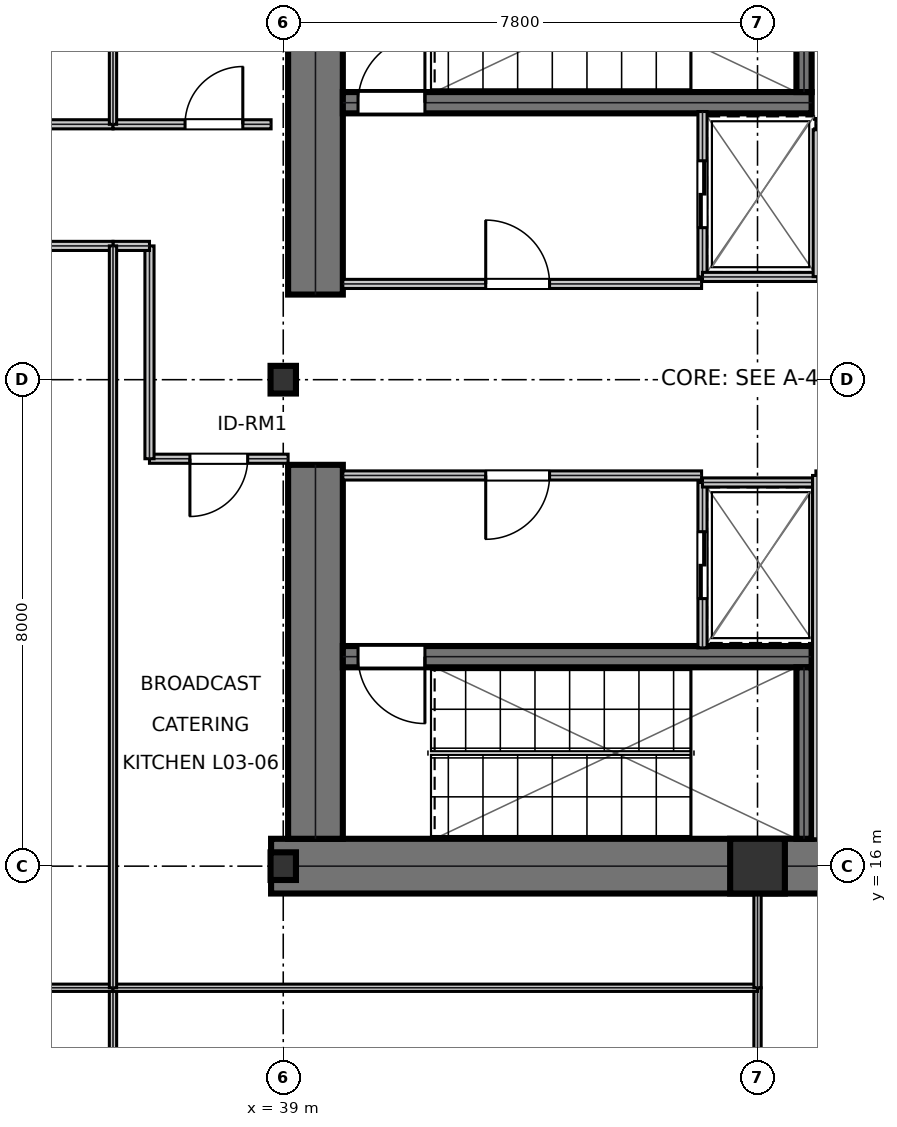
"""IFC4 building model, lengths in metres.
Left out: names, types, materials, properties, quantities, classifications, styles, units other than length and angle.
Written with IfcOpenShell. Run it as: python <this file> out.ifc"""

import sys

from ifc_helpers import new_model, si_unit, direction, frame, frame_2d, origin, origin_2d, place, context, subcontext, project, spatial, rectangle, i_section, extrude, element, fill, save


model = new_model("IFC4")
c1 = context("Model", 3, precision=1e-05, world=origin(), true_north=direction((0.0, 1.0)))
c2 = subcontext(c1, "Body", "Model", "MODEL_VIEW")
j1 = project(units=[si_unit("LENGTHUNIT", "METRE"), si_unit("PLANEANGLEUNIT", "RADIAN")], contexts=[c1])
p1 = place(None, origin())
s1 = spatial("IfcSite", under=j1, at=p1, CompositionType="ELEMENT")
p2 = place(p1, origin())
s2 = spatial("IfcBuilding", under=s1, at=p2, CompositionType="ELEMENT")
p3 = place(p2, frame((0.0, 0.0, 16.2)))
s3 = spatial("IfcBuildingStorey", under=s2, at=p3, CompositionType="ELEMENT", Elevation=16.2)
p4 = place(p3, frame((38.8, 16.0, 0.0), z_axis=(0.0, 0.0, 1.0), x_axis=(1.0, 0.0, 0.0)))
e1 = element("IfcWall", 1, at=p4, inside=s3, PredefinedType="SHEAR", context=c2, shape_type="SweptSolid", body=[
    extrude(rectangle(XDim=16.0, YDim=0.9, at=frame_2d((8.0, 0.0))), origin(), (0.0, 0.0, 1.0), 5.12),
])
for number, where, z_axis, x_axis in (
    (2, (39.53, 16.45, 0.0), (0.0, 0.0, 1.0), (0.0, 1.0, 0.0)),
    (3, (39.53, 25.4, 0.0), (0.0, 0.0, 1.0), (0.0, 1.0, 0.0)),
):
    element("IfcWall", number, at=place(p3, frame(where, z_axis=z_axis, x_axis=x_axis)), inside=s3, PredefinedType="SHEAR", context=c2, shape_type="SweptSolid", body=[
        extrude(rectangle(XDim=6.15, YDim=0.9, at=frame_2d((3.075, 0.0))), origin(), (0.0, 0.0, 1.0), 5.12),
    ])
p5 = place(p3, frame((39.98, 28.555, 0.0), z_axis=(0.0, 0.0, 1.0), x_axis=(1.0, 0.0, 0.0)))
e4 = element("IfcWall", 4, at=p5, inside=s3, PredefinedType="SHEAR", context=c2, shape_type="SweptSolid", body=[
    extrude(rectangle(XDim=7.71, YDim=0.35, at=frame_2d((3.855, 0.0))), origin(), (0.0, 0.0, 1.0), 5.12),
])
p6 = place(p5, frame((0.25, 0.0, 0.0)))
e5 = element("IfcOpeningElement", 5, at=p6, cuts=e4, PredefinedType="OPENING", context=c2, shape_type="SweptSolid", body=[
    extrude(rectangle(XDim=1.1, YDim=2.15, at=frame_2d((0.55, 1.075))), frame((0.0, 0.185, 0.0), z_axis=(0.0, -1.0, 0.0), x_axis=(1.0, 0.0, 0.0)), (0.0, 0.0, 1.0), 0.37),
])
p7 = place(p3, frame((39.98, 19.445, 0.0), z_axis=(0.0, 0.0, 1.0), x_axis=(1.0, 0.0, 0.0)))
e6 = element("IfcWall", 6, at=p7, inside=s3, PredefinedType="SHEAR", context=c2, shape_type="SweptSolid", body=[
    extrude(rectangle(XDim=7.71, YDim=0.35, at=frame_2d((3.855, 0.0))), origin(), (0.0, 0.0, 1.0), 5.12),
])
p8 = place(p7, frame((0.25, 0.0, 0.0)))
e7 = element("IfcOpeningElement", 7, at=p8, cuts=e6, PredefinedType="OPENING", context=c2, shape_type="SweptSolid", body=[
    extrude(rectangle(XDim=1.1, YDim=2.15, at=frame_2d((0.55, 1.075))), frame((0.0, 0.185, 0.0), z_axis=(0.0, -1.0, 0.0), x_axis=(1.0, 0.0, 0.0)), (0.0, 0.0, 1.0), 0.37),
])
for number, where, z_axis, x_axis in (
    (8, (47.565, 28.73, 0.0), (0.0, 0.0, 1.0), (0.0, 1.0, 0.0)),
    (9, (47.565, 16.45, 0.0), (0.0, 0.0, 1.0), (0.0, 1.0, 0.0)),
):
    element("IfcWall", number, at=place(p3, frame(where, z_axis=z_axis, x_axis=x_axis)), inside=s3, PredefinedType="SHEAR", context=c2, shape_type="SweptSolid", body=[
        extrude(rectangle(XDim=2.82, YDim=0.25, at=frame_2d((1.41, 0.0))), origin(), (0.0, 0.0, 1.0), 5.12),
    ])
for number, where, z_axis, x_axis in (
    (10, (39.0, 16.0, 0.0), (0.0, 0.0, 1.0), (1.0, 0.0, 0.0)),
    (11, (39.0, 24.0, 0.0), (0.0, 0.0, 1.0), (1.0, 0.0, 0.0)),
):
    element("IfcColumn", number, at=place(p3, frame(where, z_axis=z_axis, x_axis=x_axis)), inside=s3, PredefinedType="COLUMN", context=c2, shape_type="SweptSolid", body=[
        extrude(i_section(OverallWidth=0.418, OverallDepth=0.455, WebThickness=0.042, FlangeThickness=0.068, at=origin_2d()), origin(), (0.0, 0.0, 1.0), 5.395),
    ])
p9 = place(p3, frame((46.8, 16.0, 0.0), z_axis=(0.0, 0.0, 1.0), x_axis=(1.0, 0.0, 0.0)))
e12 = element("IfcColumn", 12, at=p9, inside=s3, PredefinedType="COLUMN", context=c2, shape_type="SweptSolid", body=[
    extrude(rectangle(XDim=0.9, YDim=0.9, at=origin_2d()), origin(), (0.0, 0.0, 1.0), 5.395),
])
p10 = place(p3, frame((39.98, 25.575, 0.0), z_axis=(0.0, 0.0, 1.0), x_axis=(1.0, 0.0, 0.0)))
e13 = element("IfcWall", 13, at=p10, inside=s3, PredefinedType="PARTITIONING", context=c2, shape_type="SweptSolid", body=[
    extrude(rectangle(XDim=5.9, YDim=0.15, at=frame_2d((2.95, 0.0))), origin(), (0.0, 0.0, 1.0), 5.12),
])
p11 = place(p10, frame((2.35, 0.0, 0.0)))
e14 = element("IfcOpeningElement", 14, at=p11, cuts=e13, PredefinedType="OPENING", context=c2, shape_type="SweptSolid", body=[
    extrude(rectangle(XDim=1.05, YDim=2.15, at=frame_2d((0.525, 1.075))), frame((0.0, 0.085, 0.0), z_axis=(0.0, -1.0, 0.0), x_axis=(1.0, 0.0, 0.0)), (0.0, 0.0, 1.0), 0.17),
])
p12 = place(p3, frame((39.98, 22.425, 0.0), z_axis=(0.0, 0.0, 1.0), x_axis=(1.0, 0.0, 0.0)))
e15 = element("IfcWall", 15, at=p12, inside=s3, PredefinedType="PARTITIONING", context=c2, shape_type="SweptSolid", body=[
    extrude(rectangle(XDim=5.9, YDim=0.15, at=frame_2d((2.95, 0.0))), origin(), (0.0, 0.0, 1.0), 5.12),
])
p13 = place(p12, frame((2.35, 0.0, 0.0)))
e16 = element("IfcOpeningElement", 16, at=p13, cuts=e15, PredefinedType="OPENING", context=c2, shape_type="SweptSolid", body=[
    extrude(rectangle(XDim=1.05, YDim=2.15, at=frame_2d((0.525, 1.075))), frame((0.0, 0.085, 0.0), z_axis=(0.0, -1.0, 0.0), x_axis=(1.0, 0.0, 0.0)), (0.0, 0.0, 1.0), 0.17),
])
p14 = place(p3, frame((45.895, 25.69, 0.0), z_axis=(0.0, 0.0, 1.0), x_axis=(0.0, 1.0, 0.0)))
e17 = element("IfcWall", 17, at=p14, inside=s3, PredefinedType="PARTITIONING", context=c2, shape_type="SweptSolid", body=[
    extrude(rectangle(XDim=2.72, YDim=0.15, at=frame_2d((1.36, 0.0))), origin(), (0.0, 0.0, 1.0), 5.12),
])
p15 = place(p14, frame((0.81, 0.0, 0.0)))
e18 = element("IfcOpeningElement", 18, at=p15, cuts=e17, PredefinedType="OPENING", context=c2, shape_type="SweptSolid", body=[
    extrude(rectangle(XDim=1.1, YDim=2.15, at=frame_2d((0.55, 1.075))), frame((0.0, 0.085, 0.0), z_axis=(0.0, -1.0, 0.0), x_axis=(1.0, 0.0, 0.0)), (0.0, 0.0, 1.0), 0.17),
])
p16 = place(p3, frame((45.895, 25.69, 0.0), z_axis=(0.0, 0.0, 1.0), x_axis=(1.0, 0.0, 0.0)))
e19 = element("IfcWall", 19, at=p16, inside=s3, PredefinedType="PARTITIONING", context=c2, shape_type="SweptSolid", body=[
    extrude(rectangle(XDim=1.915, YDim=0.15, at=frame_2d((0.958, 0.0))), origin(), (0.0, 0.0, 1.0), 5.12),
])
p17 = place(p3, frame((45.895, 19.59, 0.0), z_axis=(0.0, 0.0, 1.0), x_axis=(0.0, 1.0, 0.0)))
e20 = element("IfcWall", 20, at=p17, inside=s3, PredefinedType="PARTITIONING", context=c2, shape_type="SweptSolid", body=[
    extrude(rectangle(XDim=2.72, YDim=0.15, at=frame_2d((1.36, 0.0))), origin(), (0.0, 0.0, 1.0), 5.12),
])
p18 = place(p17, frame((0.81, 0.0, 0.0)))
e21 = element("IfcOpeningElement", 21, at=p18, cuts=e20, PredefinedType="OPENING", context=c2, shape_type="SweptSolid", body=[
    extrude(rectangle(XDim=1.1, YDim=2.15, at=frame_2d((0.55, 1.075))), frame((0.0, 0.085, 0.0), z_axis=(0.0, -1.0, 0.0), x_axis=(1.0, 0.0, 0.0)), (0.0, 0.0, 1.0), 0.17),
])
p19 = place(p3, frame((45.895, 22.31, 0.0), z_axis=(0.0, 0.0, 1.0), x_axis=(1.0, 0.0, 0.0)))
e22 = element("IfcWall", 22, at=p19, inside=s3, PredefinedType="PARTITIONING", context=c2, shape_type="SweptSolid", body=[
    extrude(rectangle(XDim=1.915, YDim=0.15, at=frame_2d((0.958, 0.0))), origin(), (0.0, 0.0, 1.0), 5.12),
])
p20 = place(p3, frame((47.79, 25.695, 0.0), z_axis=(0.0, 0.0, 1.0), x_axis=(0.0, 1.0, 0.0)))
e23 = element("IfcWall", 23, at=p20, inside=s3, PredefinedType="PARTITIONING", context=c2, shape_type="SweptSolid", body=[
    extrude(rectangle(XDim=2.415, YDim=0.15, at=frame_2d((1.208, 0.0))), origin(), (0.0, 0.0, 1.0), 5.12),
])
p21 = place(p3, frame((47.76, 22.425, 0.0), z_axis=(0.0, 0.0, 1.0), x_axis=(1.0, 0.0, 0.0)))
e24 = element("IfcWall", 24, at=p21, inside=s3, PredefinedType="PARTITIONING", context=c2, shape_type="SweptSolid", body=[
    extrude(rectangle(XDim=1.96, YDim=0.15, at=frame_2d((0.98, 0.0))), origin(), (0.0, 0.0, 1.0), 5.12),
])
p22 = place(p3, frame((47.78, 16.45, 0.0), z_axis=(0.0, 0.0, 1.0), x_axis=(0.0, 1.0, 0.0)))
e25 = element("IfcWall", 25, at=p22, inside=s3, PredefinedType="PARTITIONING", context=c2, shape_type="SweptSolid", body=[
    extrude(rectangle(XDim=5.975, YDim=0.15, at=frame_2d((2.988, 0.0))), origin(), (0.0, 0.0, 1.0), 5.12),
])
p23 = place(p3, frame((47.76, 28.22, 0.0), z_axis=(0.0, 0.0, 1.0), x_axis=(1.0, 0.0, 0.0)))
e26 = element("IfcWall", 26, at=p23, inside=s3, PredefinedType="PARTITIONING", context=c2, shape_type="SweptSolid", body=[
    extrude(rectangle(XDim=1.96, YDim=0.15, at=frame_2d((0.98, 0.0))), origin(), (0.0, 0.0, 1.0), 5.12),
])
p24 = place(p3, frame((36.8, 22.7, 0.0), z_axis=(0.0, 0.0, 1.0), x_axis=(1.0, 0.0, 0.0)))
e27 = element("IfcWall", 27, at=p24, inside=s3, PredefinedType="PARTITIONING", context=c2, shape_type="SweptSolid", body=[
    extrude(rectangle(XDim=2.28, YDim=0.15, at=frame_2d((1.14, 0.0))), origin(), (0.0, 0.0, 1.0), 4.415),
])
p25 = place(p24, frame((0.665, 0.0, 0.0)))
e28 = element("IfcOpeningElement", 28, at=p25, cuts=e27, PredefinedType="OPENING", context=c2, shape_type="SweptSolid", body=[
    extrude(rectangle(XDim=0.95, YDim=2.15, at=frame_2d((0.475, 1.075))), frame((0.0, 0.085, 0.0), z_axis=(0.0, -1.0, 0.0), x_axis=(1.0, 0.0, 0.0)), (0.0, 0.0, 1.0), 0.17),
])
p26 = place(p3, frame((28.2, 28.2, 0.0), z_axis=(0.0, 0.0, 1.0), x_axis=(1.0, 0.0, 0.0)))
e29 = element("IfcWall", 29, at=p26, inside=s3, PredefinedType="PARTITIONING", context=c2, shape_type="SweptSolid", body=[
    extrude(rectangle(XDim=8.0, YDim=0.15, at=frame_2d((4.0, 0.0))), origin(), (0.0, 0.0, 1.0), 4.415),
])
p27 = place(p26, frame((3.55, 0.0, 0.0)))
e30 = element("IfcOpeningElement", 30, at=p27, cuts=e29, PredefinedType="OPENING", context=c2, shape_type="SweptSolid", body=[
    extrude(rectangle(XDim=0.9, YDim=2.15, at=frame_2d((0.45, 1.075))), frame((0.0, 0.085, 0.0), z_axis=(0.0, -1.0, 0.0), x_axis=(1.0, 0.0, 0.0)), (0.0, 0.0, 1.0), 0.17),
])
p28 = place(p3, frame((36.2, 28.2, 0.0), z_axis=(0.0, 0.0, 1.0), x_axis=(1.0, 0.0, 0.0)))
e31 = element("IfcWall", 31, at=p28, inside=s3, PredefinedType="PARTITIONING", context=c2, shape_type="SweptSolid", body=[
    extrude(rectangle(XDim=2.6, YDim=0.15, at=frame_2d((1.3, 0.0))), origin(), (0.0, 0.0, 1.0), 5.12),
])
p29 = place(p28, frame((1.185, 0.0, 0.0)))
e32 = element("IfcOpeningElement", 32, at=p29, cuts=e31, PredefinedType="OPENING", context=c2, shape_type="SweptSolid", body=[
    extrude(rectangle(XDim=0.95, YDim=2.15, at=frame_2d((0.475, 1.075))), frame((0.0, 0.085, 0.0), z_axis=(0.0, -1.0, 0.0), x_axis=(1.0, 0.0, 0.0)), (0.0, 0.0, 1.0), 0.17),
])
p30 = place(p3, frame((36.8, 22.7, 0.0), z_axis=(0.0, 0.0, 1.0), x_axis=(0.0, 1.0, 0.0)))
e33 = element("IfcWall", 33, at=p30, inside=s3, PredefinedType="PARTITIONING", context=c2, shape_type="SweptSolid", body=[
    extrude(rectangle(XDim=3.5, YDim=0.15, at=frame_2d((1.75, 0.0))), origin(), (0.0, 0.0, 1.0), 4.338),
])
p31 = place(p3, frame((36.2, 26.2, 0.0), z_axis=(0.0, 0.0, 1.0), x_axis=(1.0, 0.0, 0.0)))
e34 = element("IfcWall", 34, at=p31, inside=s3, PredefinedType="PARTITIONING", context=c2, shape_type="SweptSolid", body=[
    extrude(rectangle(XDim=0.6, YDim=0.15, at=frame_2d((0.3, 0.0))), origin(), (0.0, 0.0, 1.0), 5.12),
])
p32 = place(p3, frame((28.2, 26.2, 0.0), z_axis=(0.0, 0.0, 1.0), x_axis=(1.0, 0.0, 0.0)))
e35 = element("IfcWall", 35, at=p32, inside=s3, PredefinedType="PARTITIONING", context=c2, shape_type="SweptSolid", body=[
    extrude(rectangle(XDim=8.0, YDim=0.15, at=frame_2d((4.0, 0.0))), origin(), (0.0, 0.0, 1.0), 4.415),
])
p33 = place(p3, frame((36.2, 4.5, 0.0), z_axis=(0.0, 0.0, 1.0), x_axis=(0.0, 1.0, 0.0)))
e36 = element("IfcWall", 36, at=p33, inside=s3, PredefinedType="PARTITIONING", context=c2, shape_type="SweptSolid", body=[
    extrude(rectangle(XDim=9.5, YDim=0.12, at=frame_2d((4.75, 0.0))), origin(), (0.0, 0.0, 1.0), 4.338),
])
p34 = place(p3, frame((28.2, 14.0, 0.0), z_axis=(0.0, 0.0, 1.0), x_axis=(1.0, 0.0, 0.0)))
e37 = element("IfcWall", 37, at=p34, inside=s3, PredefinedType="PARTITIONING", context=c2, shape_type="SweptSolid", body=[
    extrude(rectangle(XDim=8.0, YDim=0.12, at=frame_2d((4.0, 0.0))), origin(), (0.0, 0.0, 1.0), 3.688),
])
p35 = place(p3, frame((46.8, 4.5, 0.0), z_axis=(0.0, 0.0, 1.0), x_axis=(0.0, 1.0, 0.0)))
e38 = element("IfcWall", 38, at=p35, inside=s3, PredefinedType="PARTITIONING", context=c2, shape_type="SweptSolid", body=[
    extrude(rectangle(XDim=9.5, YDim=0.12, at=frame_2d((4.75, 0.0))), origin(), (0.0, 0.0, 1.0), 4.338),
])
p36 = place(p3, frame((36.2, 14.0, 0.0), z_axis=(0.0, 0.0, 1.0), x_axis=(1.0, 0.0, 0.0)))
e39 = element("IfcWall", 39, at=p36, inside=s3, PredefinedType="PARTITIONING", context=c2, shape_type="SweptSolid", body=[
    extrude(rectangle(XDim=10.6, YDim=0.12, at=frame_2d((5.3, 0.0))), origin(), (0.0, 0.0, 1.0), 4.415),
])
p37 = place(p3, frame((46.8, 14.0, 0.0), z_axis=(0.0, 0.0, 1.0), x_axis=(0.0, 1.0, 0.0)))
e40 = element("IfcWall", 40, at=p37, inside=s3, PredefinedType="PARTITIONING", context=c2, shape_type="SweptSolid", body=[
    extrude(rectangle(XDim=1.6, YDim=0.12, at=frame_2d((0.8, 0.0))), origin(), (0.0, 0.0, 1.0), 4.415),
])
p38 = place(p3, frame((36.2, 14.0, 0.0), z_axis=(0.0, 0.0, 1.0), x_axis=(0.0, 1.0, 0.0)))
e41 = element("IfcWall", 41, at=p38, inside=s3, PredefinedType="PARTITIONING", context=c2, shape_type="SweptSolid", body=[
    extrude(rectangle(XDim=12.2, YDim=0.12, at=frame_2d((6.1, 0.0))), origin(), (0.0, 0.0, 1.0), 3.688),
])
p39 = place(p3, frame((36.2, 28.2, 0.0), z_axis=(0.0, 0.0, 1.0), x_axis=(0.0, 1.0, 0.0)))
e42 = element("IfcWall", 42, at=p39, inside=s3, PredefinedType="PARTITIONING", context=c2, shape_type="SweptSolid", body=[
    extrude(rectangle(XDim=7.5, YDim=0.12, at=frame_2d((3.75, 0.0))), origin(), (0.0, 0.0, 1.0), 4.338),
])
p40 = place(p11, origin())
e43 = element("IfcDoor", 43, at=p40, inside=s3, OperationType="SINGLE_SWING_LEFT", PredefinedType="DOOR", context=c2, shape_type="SweptSolid", body=[
    extrude(rectangle(XDim=1.05, YDim=2.15, at=frame_2d((0.525, 1.075))), frame((0.0, 0.025, 0.0), z_axis=(0.0, -1.0, 0.0), x_axis=(1.0, 0.0, 0.0)), (0.0, 0.0, 1.0), 0.05),
])
fill(e14, e43)
p41 = place(p13, frame((1.05, 0.0, 0.0), z_axis=(0.0, 0.0, 1.0), x_axis=(-1.0, 0.0, 0.0)))
e44 = element("IfcDoor", 44, at=p41, inside=s3, OperationType="SINGLE_SWING_RIGHT", PredefinedType="DOOR", context=c2, shape_type="SweptSolid", body=[
    extrude(rectangle(XDim=1.05, YDim=2.15, at=frame_2d((0.525, 1.075))), frame((0.0, 0.025, 0.0), z_axis=(0.0, -1.0, 0.0), x_axis=(1.0, 0.0, 0.0)), (0.0, 0.0, 1.0), 0.05),
])
fill(e16, e44)
p42 = place(p15, frame((1.1, 0.0, 0.0), z_axis=(0.0, 0.0, 1.0), x_axis=(-1.0, 0.0, 0.0)))
e45 = element("IfcDoor", 45, at=p42, inside=s3, OperationType="DOUBLE_DOOR_SLIDING", PredefinedType="DOOR", context=c2, shape_type="SweptSolid", body=[
    extrude(rectangle(XDim=1.1, YDim=2.15, at=frame_2d((0.55, 1.075))), frame((0.0, 0.025, 0.0), z_axis=(0.0, -1.0, 0.0), x_axis=(1.0, 0.0, 0.0)), (0.0, 0.0, 1.0), 0.05),
])
fill(e18, e45)
p43 = place(p18, frame((1.1, 0.0, 0.0), z_axis=(0.0, 0.0, 1.0), x_axis=(-1.0, 0.0, 0.0)))
e46 = element("IfcDoor", 46, at=p43, inside=s3, OperationType="DOUBLE_DOOR_SLIDING", PredefinedType="DOOR", context=c2, shape_type="SweptSolid", body=[
    extrude(rectangle(XDim=1.1, YDim=2.15, at=frame_2d((0.55, 1.075))), frame((0.0, 0.025, 0.0), z_axis=(0.0, -1.0, 0.0), x_axis=(1.0, 0.0, 0.0)), (0.0, 0.0, 1.0), 0.05),
])
fill(e21, e46)
p44 = place(p25, frame((0.95, 0.0, 0.0), z_axis=(0.0, 0.0, 1.0), x_axis=(-1.0, 0.0, 0.0)))
e47 = element("IfcDoor", 47, at=p44, inside=s3, OperationType="SINGLE_SWING_RIGHT", PredefinedType="DOOR", context=c2, shape_type="SweptSolid", body=[
    extrude(rectangle(XDim=0.95, YDim=2.15, at=frame_2d((0.475, 1.075))), frame((0.0, 0.025, 0.0), z_axis=(0.0, -1.0, 0.0), x_axis=(1.0, 0.0, 0.0)), (0.0, 0.0, 1.0), 0.05),
])
fill(e28, e47)
p45 = place(p29, origin())
e48 = element("IfcDoor", 48, at=p45, inside=s3, OperationType="SINGLE_SWING_RIGHT", PredefinedType="DOOR", context=c2, shape_type="SweptSolid", body=[
    extrude(rectangle(XDim=0.95, YDim=2.15, at=frame_2d((0.475, 1.075))), frame((0.0, 0.025, 0.0), z_axis=(0.0, -1.0, 0.0), x_axis=(1.0, 0.0, 0.0)), (0.0, 0.0, 1.0), 0.05),
])
fill(e32, e48)
p46 = place(p6, origin())
e49 = element("IfcDoor", 49, at=p46, inside=s3, OperationType="SINGLE_SWING_RIGHT", PredefinedType="DOOR", context=c2, shape_type="SweptSolid", body=[
    extrude(rectangle(XDim=1.1, YDim=2.15, at=frame_2d((0.55, 1.075))), frame((0.0, 0.025, 0.0), z_axis=(0.0, -1.0, 0.0), x_axis=(1.0, 0.0, 0.0)), (0.0, 0.0, 1.0), 0.05),
])
fill(e5, e49)
p47 = place(p8, frame((1.1, 0.0, 0.0), z_axis=(0.0, 0.0, 1.0), x_axis=(-1.0, 0.0, 0.0)))
e50 = element("IfcDoor", 50, at=p47, inside=s3, OperationType="SINGLE_SWING_LEFT", PredefinedType="DOOR", context=c2, shape_type="SweptSolid", body=[
    extrude(rectangle(XDim=1.1, YDim=2.15, at=frame_2d((0.55, 1.075))), frame((0.0, 0.025, 0.0), z_axis=(0.0, -1.0, 0.0), x_axis=(1.0, 0.0, 0.0)), (0.0, 0.0, 1.0), 0.05),
])
fill(e7, e50)
save(model, sys.argv[1])
